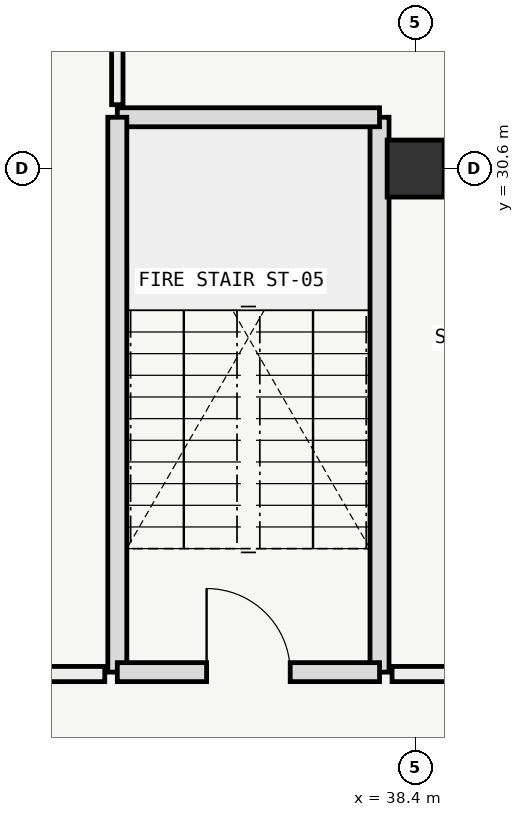
"""IFC4 building model, lengths in metres.
Left out: names, types, materials, properties, quantities, classifications, styles, units other than length and angle.
Written with IfcOpenShell. Run it as: python <this file> out.ifc"""

import sys

from ifc_helpers import new_model, si_unit, direction, frame, frame_2d, origin, origin_2d, place, context, subcontext, project, spatial, rectangle, extrude, element, fill, save


model = new_model("IFC4")
c1 = context("Model", 3, precision=1e-05, world=origin(), true_north=direction((0.0, 1.0)))
c2 = subcontext(c1, "Body", "Model", "MODEL_VIEW")
j1 = project(units=[si_unit("LENGTHUNIT", "METRE"), si_unit("PLANEANGLEUNIT", "RADIAN")], contexts=[c1])
p1 = place(None, origin())
s1 = spatial("IfcSite", under=j1, at=p1, CompositionType="ELEMENT")
p2 = place(p1, origin())
s2 = spatial("IfcBuilding", under=s1, at=p2, CompositionType="ELEMENT")
p3 = place(p2, frame((0.0, 0.0, 5.4)))
s3 = spatial("IfcBuildingStorey", under=s2, at=p3, CompositionType="ELEMENT", Elevation=5.4)
p4 = place(p3, frame((38.4, 30.6, 0.0), z_axis=(0.0, 0.0, 1.0), x_axis=(1.0, 0.0, 0.0)))
e1 = element("IfcColumn", 1, at=p4, inside=s3, PredefinedType="COLUMN", context=c2, shape_type="SweptSolid", body=[
    extrude(rectangle(XDim=0.75, YDim=0.75, at=origin_2d()), origin(), (0.0, 0.0, 1.0), 4.2),
])
p5 = place(p3, frame((37.925, 23.975, 0.0), z_axis=(0.0, 0.0, 1.0), x_axis=(0.0, 1.0, 0.0)))
e2 = element("IfcWall", 2, at=p5, inside=s3, PredefinedType="SOLIDWALL", context=c2, shape_type="SweptSolid", body=[
    extrude(rectangle(XDim=7.3, YDim=0.25, at=frame_2d((3.65, 0.0))), origin(), (0.0, 0.0, 1.0), 3.92),
])
p6 = place(p3, frame((37.925, 31.275, 0.0), z_axis=(0.0, 0.0, 1.0), x_axis=(-1.0, 0.0, 0.0)))
e3 = element("IfcWall", 3, at=p6, inside=s3, PredefinedType="SOLIDWALL", context=c2, shape_type="SweptSolid", body=[
    extrude(rectangle(XDim=3.45, YDim=0.25, at=frame_2d((1.725, 0.0))), origin(), (0.0, 0.0, 1.0), 3.92),
])
p7 = place(p3, frame((34.475, 31.275, 0.0), z_axis=(0.0, 0.0, 1.0), x_axis=(0.0, -1.0, 0.0)))
e4 = element("IfcWall", 4, at=p7, inside=s3, PredefinedType="SOLIDWALL", context=c2, shape_type="SweptSolid", body=[
    extrude(rectangle(XDim=7.3, YDim=0.25, at=frame_2d((3.65, 0.0))), origin(), (0.0, 0.0, 1.0), 3.92),
])
p8 = place(p3, frame((34.475, 23.975, 0.0), z_axis=(0.0, 0.0, 1.0), x_axis=(1.0, 0.0, 0.0)))
e5 = element("IfcWall", 5, at=p8, inside=s3, PredefinedType="SOLIDWALL", context=c2, shape_type="SweptSolid", body=[
    extrude(rectangle(XDim=3.45, YDim=0.25, at=frame_2d((1.725, 0.0))), origin(), (0.0, 0.0, 1.0), 3.92),
])
p9 = place(p8, frame((1.175, 0.0, 0.0)))
e6 = element("IfcOpeningElement", 6, at=p9, cuts=e5, PredefinedType="OPENING", context=c2, shape_type="SweptSolid", body=[
    extrude(rectangle(XDim=1.1, YDim=2.2, at=frame_2d((0.55, 1.1))), frame((0.0, 0.135, 0.0), z_axis=(0.0, -1.0, 0.0), x_axis=(1.0, 0.0, 0.0)), (0.0, 0.0, 1.0), 0.27),
])
p10 = place(p3, frame((27.325, 23.95, 0.0), z_axis=(0.0, 0.0, 1.0), x_axis=(1.0, 0.0, 0.0)))
e7 = element("IfcWall", 7, at=p10, inside=s3, PredefinedType="PARTITIONING", context=c2, shape_type="SweptSolid", body=[
    extrude(rectangle(XDim=6.985, YDim=0.2, at=frame_2d((3.493, 0.0))), origin(), (0.0, 0.0, 1.0), 3.25),
])
p11 = place(p10, frame((4.1, 0.0, 0.0)))
e8 = element("IfcOpeningElement", 8, at=p11, cuts=e7, PredefinedType="OPENING", context=c2, shape_type="SweptSolid", body=[
    extrude(rectangle(XDim=1.4, YDim=2.2, at=frame_2d((0.7, 1.1))), frame((0.0, 0.11, 0.0), z_axis=(0.0, -1.0, 0.0), x_axis=(1.0, 0.0, 0.0)), (0.0, 0.0, 1.0), 0.22),
])
p12 = place(p3, frame((34.475, 31.44, 0.0), z_axis=(0.0, 0.0, 1.0), x_axis=(0.0, 1.0, 0.0)))
e9 = element("IfcWall", 9, at=p12, inside=s3, PredefinedType="PARTITIONING", context=c2, shape_type="SweptSolid", body=[
    extrude(rectangle(XDim=9.21, YDim=0.15, at=frame_2d((4.605, 0.0))), origin(), (0.0, 0.0, 1.0), 3.4),
])
p13 = place(p3, frame((38.09, 23.95, 0.0), z_axis=(0.0, 0.0, 1.0), x_axis=(1.0, 0.0, 0.0)))
e10 = element("IfcWall", 10, at=p13, inside=s3, PredefinedType="PARTITIONING", context=c2, shape_type="SweptSolid", body=[
    extrude(rectangle(XDim=9.76, YDim=0.2, at=frame_2d((4.88, 0.0))), origin(), (0.0, 0.0, 1.0), 3.25),
])
p14 = place(p13, frame((3.235, 0.0, 0.0)))
e11 = element("IfcOpeningElement", 11, at=p14, cuts=e10, PredefinedType="OPENING", context=c2, shape_type="SweptSolid", body=[
    extrude(rectangle(XDim=0.95, YDim=2.1, at=frame_2d((0.475, 1.05))), frame((0.0, 0.11, 0.0), z_axis=(0.0, -1.0, 0.0), x_axis=(1.0, 0.0, 0.0)), (0.0, 0.0, 1.0), 0.22),
])
p15 = place(p9, origin())
e12 = element("IfcDoor", 12, at=p15, inside=s3, OperationType="SINGLE_SWING_LEFT", PredefinedType="DOOR", context=c2, shape_type="SweptSolid", body=[
    extrude(rectangle(XDim=1.1, YDim=2.2, at=frame_2d((0.55, 1.1))), frame((0.0, 0.025, 0.0), z_axis=(0.0, -1.0, 0.0), x_axis=(1.0, 0.0, 0.0)), (0.0, 0.0, 1.0), 0.05),
])
fill(e6, e12)
save(model, sys.argv[1])
